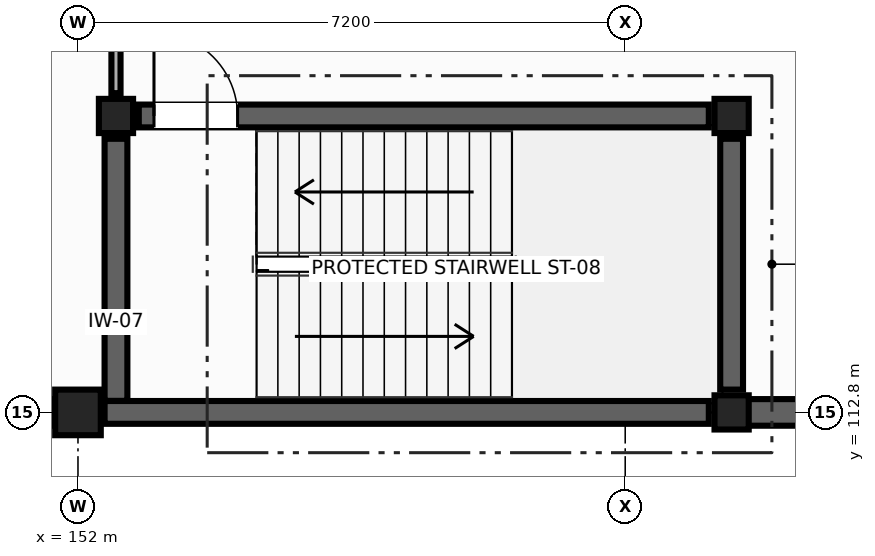
"""IFC4 building model, lengths in metres.
Left out: names, types, materials, properties, quantities, classifications, styles, units other than length and angle.
Written with IfcOpenShell. Run it as: python <this file> out.ifc"""

import sys

from ifc_helpers import new_model, si_unit, direction, frame, frame_2d, origin, origin_2d, place, context, subcontext, project, spatial, rectangle, extrude, element, fill, save


model = new_model("IFC4")
c1 = context("Model", 3, precision=1e-05, world=origin(), true_north=direction((0.0, 1.0)))
c2 = subcontext(c1, "Body", "Model", "MODEL_VIEW")
j1 = project(units=[si_unit("LENGTHUNIT", "METRE"), si_unit("PLANEANGLEUNIT", "RADIAN")], contexts=[c1])
p1 = place(None, origin())
s1 = spatial("IfcSite", under=j1, at=p1, CompositionType="ELEMENT")
p2 = place(p1, origin())
s2 = spatial("IfcBuilding", under=s1, at=p2, CompositionType="ELEMENT")
p3 = place(p2, frame((0.0, 0.0, 14.4)))
s3 = spatial("IfcBuildingStorey", under=s2, at=p3, CompositionType="ELEMENT", Elevation=14.4)
p4 = place(p3, frame((152.0, 112.8, 0.0), z_axis=(0.0, 0.0, 1.0), x_axis=(1.0, 0.0, 0.0)))
e1 = element("IfcColumn", 1, at=p4, inside=s3, PredefinedType="COLUMN", context=c2, shape_type="SweptSolid", body=[
    extrude(rectangle(XDim=0.6, YDim=0.6, at=origin_2d()), origin(), (0.0, 0.0, 1.0), 4.5),
])
for number, where, z_axis, x_axis in (
    (2, (160.6, 112.8, 0.0), (0.0, 0.0, 1.0), (1.0, 0.0, 0.0)),
    (3, (160.6, 116.7, 0.0), (0.0, 0.0, 1.0), (1.0, 0.0, 0.0)),
    (4, (152.5, 116.7, 0.0), (0.0, 0.0, 1.0), (1.0, 0.0, 0.0)),
):
    element("IfcColumn", number, at=place(p3, frame(where, z_axis=z_axis, x_axis=x_axis)), inside=s3, PredefinedType="COLUMN", context=c2, shape_type="SweptSolid", body=[
        extrude(rectangle(XDim=0.45, YDim=0.45, at=origin_2d()), origin(), (0.0, 0.0, 1.0), 4.5),
    ])
p5 = place(p3, frame((166.1, 112.8, 0.0), z_axis=(0.0, 0.0, 1.0), x_axis=(-1.0, 0.0, 0.0)))
e5 = element("IfcWall", 5, at=p5, inside=s3, PredefinedType="SOLIDWALL", context=c2, shape_type="SweptSolid", body=[
    extrude(rectangle(XDim=5.35, YDim=0.35, at=frame_2d((2.675, 0.0))), origin(), (0.0, 0.0, 1.0), 4.22),
])
p6 = place(p3, frame((151.7, 112.8, 0.0), z_axis=(0.0, 0.0, 1.0), x_axis=(-1.0, 0.0, 0.0)))
e6 = element("IfcWall", 6, at=p6, inside=s3, PredefinedType="SOLIDWALL", context=c2, shape_type="SweptSolid", body=[
    extrude(rectangle(XDim=6.6, YDim=0.35, at=frame_2d((3.3, 0.0))), origin(), (0.0, 0.0, 1.0), 4.22),
])
p7 = place(p6, frame((2.1, 0.0, 0.85)))
e7 = element("IfcOpeningElement", 7, at=p7, cuts=e6, PredefinedType="OPENING", context=c2, shape_type="SweptSolid", body=[
    extrude(rectangle(XDim=2.4, YDim=1.2, at=frame_2d((1.2, 0.6))), frame((0.0, 0.185, 0.0), z_axis=(0.0, -1.0, 0.0), x_axis=(1.0, 0.0, 0.0)), (0.0, 0.0, 1.0), 0.37),
])
p8 = place(p3, frame((160.3, 112.8, 0.0), z_axis=(0.0, 0.0, 1.0), x_axis=(-1.0, 0.0, 0.0)))
e8 = element("IfcWall", 8, at=p8, inside=s3, PredefinedType="SHEAR", context=c2, shape_type="SweptSolid", body=[
    extrude(rectangle(XDim=7.95, YDim=0.3, at=frame_2d((3.975, 0.0))), origin(), (0.0, 0.0, 1.0), 4.22),
])
p9 = place(p3, frame((152.5, 112.952, 0.0), z_axis=(0.0, 0.0, 1.0), x_axis=(0.0, 1.0, 0.0)))
e9 = element("IfcWall", 9, at=p9, inside=s3, PredefinedType="SHEAR", context=c2, shape_type="SweptSolid", body=[
    extrude(rectangle(XDim=3.448, YDim=0.3, at=frame_2d((1.724, 0.0))), origin(), (0.0, 0.0, 1.0), 4.22),
])
p10 = place(p3, frame((152.8, 116.7, 0.0), z_axis=(0.0, 0.0, 1.0), x_axis=(1.0, 0.0, 0.0)))
e10 = element("IfcWall", 10, at=p10, inside=s3, PredefinedType="SHEAR", context=c2, shape_type="SweptSolid", body=[
    extrude(rectangle(XDim=7.5, YDim=0.3, at=frame_2d((3.75, 0.0))), origin(), (0.0, 0.0, 1.0), 4.22),
])
p11 = place(p10, frame((0.2, 0.0, 0.0)))
e11 = element("IfcOpeningElement", 11, at=p11, cuts=e10, PredefinedType="OPENING", context=c2, shape_type="SweptSolid", body=[
    extrude(rectangle(XDim=1.1, YDim=2.15, at=frame_2d((0.55, 1.075))), frame((0.0, 0.16, 0.0), z_axis=(0.0, -1.0, 0.0), x_axis=(1.0, 0.0, 0.0)), (0.0, 0.0, 1.0), 0.32),
])
p12 = place(p3, frame((160.6, 116.4, 0.0), z_axis=(0.0, 0.0, 1.0), x_axis=(0.0, -1.0, 0.0)))
e12 = element("IfcWall", 12, at=p12, inside=s3, PredefinedType="SHEAR", context=c2, shape_type="SweptSolid", body=[
    extrude(rectangle(XDim=3.3, YDim=0.3, at=frame_2d((1.65, 0.0))), origin(), (0.0, 0.0, 1.0), 4.22),
])
p13 = place(p3, frame((152.5, 117.0, 0.0), z_axis=(0.0, 0.0, 1.0), x_axis=(0.0, 1.0, 0.0)))
e13 = element("IfcWall", 13, at=p13, inside=s3, PredefinedType="PARTITIONING", context=c2, shape_type="SweptSolid", body=[
    extrude(rectangle(XDim=3.4, YDim=0.12, at=frame_2d((1.7, 0.0))), origin(), (0.0, 0.0, 1.0), 3.715),
])
p14 = place(p11, origin())
e14 = element("IfcDoor", 14, at=p14, inside=s3, OperationType="SINGLE_SWING_LEFT", PredefinedType="DOOR", context=c2, shape_type="SweptSolid", body=[
    extrude(rectangle(XDim=1.1, YDim=2.15, at=frame_2d((0.55, 1.075))), frame((0.0, 0.025, 0.0), z_axis=(0.0, -1.0, 0.0), x_axis=(1.0, 0.0, 0.0)), (0.0, 0.0, 1.0), 0.05),
])
fill(e11, e14)
save(model, sys.argv[1])
